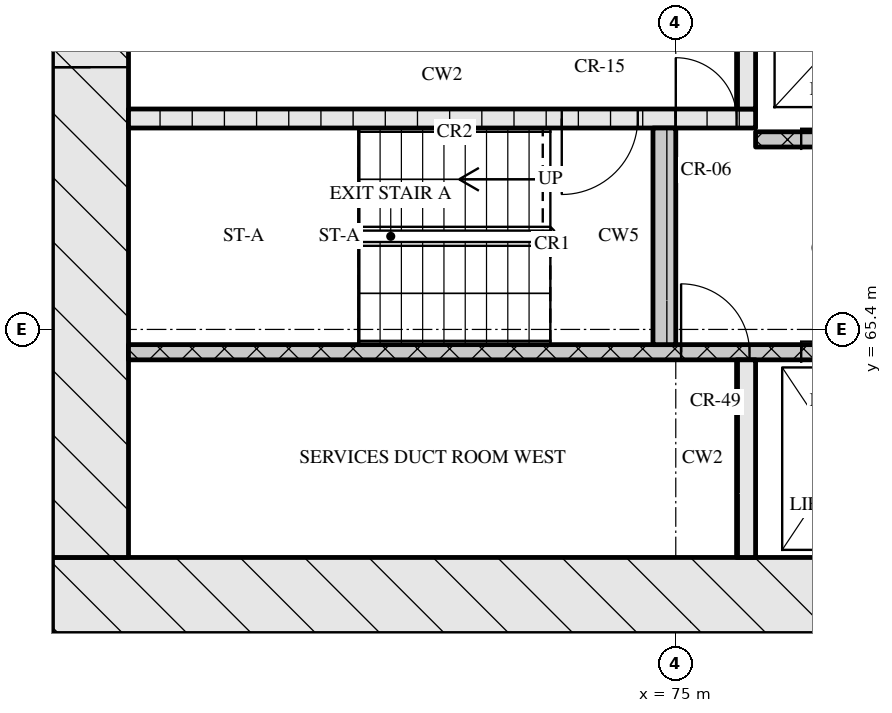
"""IFC4 building model, lengths in metres.
Left out: names, types, materials, properties, quantities, classifications, styles, units other than length and angle.
Written with IfcOpenShell. Run it as: python <this file> out.ifc"""

import sys

from ifc_helpers import new_model, si_unit, direction, frame, frame_2d, origin, place, context, subcontext, project, spatial, rectangle, extrude, element, fill, save


model = new_model("IFC4")
c1 = context("Model", 3, precision=1e-05, world=origin(), true_north=direction((0.0, 1.0)))
c2 = subcontext(c1, "Body", "Model", "MODEL_VIEW")
j1 = project(units=[si_unit("LENGTHUNIT", "METRE"), si_unit("PLANEANGLEUNIT", "RADIAN")], contexts=[c1])
p1 = place(None, origin())
s1 = spatial("IfcSite", under=j1, at=p1, CompositionType="ELEMENT")
p2 = place(p1, origin())
s2 = spatial("IfcBuilding", under=s1, at=p2, CompositionType="ELEMENT")
p3 = place(p2, frame((0.0, 0.0, 102.45)))
s3 = spatial("IfcBuildingStorey", under=s2, at=p3, CompositionType="ELEMENT", Elevation=102.45)
p4 = place(p3, frame((66.8, 61.9, 0.0), z_axis=(0.0, 0.0, 1.0), x_axis=(1.0, 0.0, 0.0)))
e1 = element("IfcWall", 1, at=p4, inside=s3, PredefinedType="SOLIDWALL", context=c2, shape_type="SweptSolid", body=[
    extrude(rectangle(XDim=41.6, YDim=1.0, at=frame_2d((20.8, 0.0))), origin(), (0.0, 0.0, 1.0), 3.32),
])
p5 = place(p4, frame((21.15, 0.0, 0.0)))
e2 = element("IfcOpeningElement", 2, at=p5, cuts=e1, PredefinedType="OPENING", context=c2, shape_type="SweptSolid", body=[
    extrude(rectangle(XDim=1.8, YDim=2.1, at=frame_2d((0.9, 1.05))), frame((0.0, 0.51, 0.0), z_axis=(0.0, -1.0, 0.0), x_axis=(1.0, 0.0, 0.0)), (0.0, 0.0, 1.0), 1.02),
])
p6 = place(p3, frame((67.3, 62.4, 0.0), z_axis=(0.0, 0.0, 1.0), x_axis=(0.0, 1.0, 0.0)))
e3 = element("IfcWall", 3, at=p6, inside=s3, PredefinedType="SOLIDWALL", context=c2, shape_type="SweptSolid", body=[
    extrude(rectangle(XDim=12.0, YDim=1.0, at=frame_2d((6.0, 0.0))), origin(), (0.0, 0.0, 1.0), 3.32),
])
p7 = place(p6, frame((6.45, 0.0, 0.0)))
e4 = element("IfcOpeningElement", 4, at=p7, cuts=e3, PredefinedType="OPENING", context=c2, shape_type="SweptSolid", body=[
    extrude(rectangle(XDim=1.2, YDim=2.1, at=frame_2d((0.6, 1.05))), frame((0.0, 0.51, 0.0), z_axis=(0.0, -1.0, 0.0), x_axis=(1.0, 0.0, 0.0)), (0.0, 0.0, 1.0), 1.02),
])
p8 = place(p3, frame((75.925, 62.4, 0.0), z_axis=(0.0, 0.0, 1.0), x_axis=(0.0, 1.0, 0.0)))
e5 = element("IfcWall", 5, at=p8, inside=s3, PredefinedType="SOLIDWALL", context=c2, shape_type="SweptSolid", body=[
    extrude(rectangle(XDim=2.6, YDim=0.25, at=frame_2d((1.3, 0.0))), origin(), (0.0, 0.0, 1.0), 3.32),
])
p9 = place(p3, frame((67.8, 65.1, 0.0), z_axis=(0.0, 0.0, 1.0), x_axis=(1.0, 0.0, 0.0)))
e6 = element("IfcWall", 6, at=p9, inside=s3, PredefinedType="SOLIDWALL", context=c2, shape_type="SweptSolid", body=[
    extrude(rectangle(XDim=18.5, YDim=0.2, at=frame_2d((9.25, 0.0))), origin(), (0.0, 0.0, 1.0), 3.32),
])
p10 = place(p9, frame((7.27, 0.0, 0.0)))
e7 = element("IfcOpeningElement", 7, at=p10, cuts=e6, PredefinedType="OPENING", context=c2, shape_type="SweptSolid", body=[
    extrude(rectangle(XDim=0.9, YDim=2.1, at=frame_2d((0.45, 1.05))), frame((0.0, 0.11, 0.0), z_axis=(0.0, -1.0, 0.0), x_axis=(1.0, 0.0, 0.0)), (0.0, 0.0, 1.0), 0.22),
])
p11 = place(p9, frame((8.85, 0.0, 0.0)))
e8 = element("IfcOpeningElement", 8, at=p11, cuts=e6, PredefinedType="OPENING", context=c2, shape_type="SweptSolid", body=[
    extrude(rectangle(XDim=1.1, YDim=2.1, at=frame_2d((0.55, 1.05))), frame((0.0, 0.11, 0.0), z_axis=(0.0, -1.0, 0.0), x_axis=(1.0, 0.0, 0.0)), (0.0, 0.0, 1.0), 0.22),
])
p12 = place(p9, frame((11.35, 0.0, 0.0)))
e9 = element("IfcOpeningElement", 9, at=p12, cuts=e6, PredefinedType="OPENING", context=c2, shape_type="SweptSolid", body=[
    extrude(rectangle(XDim=1.1, YDim=2.1, at=frame_2d((0.55, 1.05))), frame((0.0, 0.11, 0.0), z_axis=(0.0, -1.0, 0.0), x_axis=(1.0, 0.0, 0.0)), (0.0, 0.0, 1.0), 0.22),
])
p13 = place(p9, frame((13.85, 0.0, 0.0)))
e10 = element("IfcOpeningElement", 10, at=p13, cuts=e6, PredefinedType="OPENING", context=c2, shape_type="SweptSolid", body=[
    extrude(rectangle(XDim=1.1, YDim=2.1, at=frame_2d((0.55, 1.05))), frame((0.0, 0.11, 0.0), z_axis=(0.0, -1.0, 0.0), x_axis=(1.0, 0.0, 0.0)), (0.0, 0.0, 1.0), 0.22),
])
p14 = place(p9, frame((16.7, 0.0, 0.0)))
e11 = element("IfcOpeningElement", 11, at=p14, cuts=e6, PredefinedType="OPENING", context=c2, shape_type="SweptSolid", body=[
    extrude(rectangle(XDim=0.9, YDim=2.1, at=frame_2d((0.45, 1.05))), frame((0.0, 0.11, 0.0), z_axis=(0.0, -1.0, 0.0), x_axis=(1.0, 0.0, 0.0)), (0.0, 0.0, 1.0), 0.22),
])
p15 = place(p3, frame((74.85, 65.2, 0.0), z_axis=(0.0, 0.0, 1.0), x_axis=(0.0, 1.0, 0.0)))
e12 = element("IfcWall", 12, at=p15, inside=s3, PredefinedType="SOLIDWALL", context=c2, shape_type="SweptSolid", body=[
    extrude(rectangle(XDim=2.85, YDim=0.3, at=frame_2d((1.425, 0.0))), origin(), (0.0, 0.0, 1.0), 3.32),
])
p16 = place(p3, frame((76.05, 67.9, 0.0), z_axis=(0.0, 0.0, 1.0), x_axis=(1.0, 0.0, 0.0)))
e13 = element("IfcWall", 13, at=p16, inside=s3, PredefinedType="SOLIDWALL", context=c2, shape_type="SweptSolid", body=[
    extrude(rectangle(XDim=23.1, YDim=0.2, at=frame_2d((11.55, 0.0))), origin(), (0.0, 0.0, 1.0), 3.32),
])
p17 = place(p16, frame((0.6, 0.0, 0.0)))
e14 = element("IfcOpeningElement", 14, at=p17, cuts=e13, PredefinedType="OPENING", context=c2, shape_type="SweptSolid", body=[
    extrude(rectangle(XDim=1.1, YDim=2.1, at=frame_2d((0.55, 1.05))), frame((0.0, 0.11, 0.0), z_axis=(0.0, -1.0, 0.0), x_axis=(1.0, 0.0, 0.0)), (0.0, 0.0, 1.0), 0.22),
])
p18 = place(p16, frame((3.1, 0.0, 0.0)))
e15 = element("IfcOpeningElement", 15, at=p18, cuts=e13, PredefinedType="OPENING", context=c2, shape_type="SweptSolid", body=[
    extrude(rectangle(XDim=1.1, YDim=2.1, at=frame_2d((0.55, 1.05))), frame((0.0, 0.11, 0.0), z_axis=(0.0, -1.0, 0.0), x_axis=(1.0, 0.0, 0.0)), (0.0, 0.0, 1.0), 0.22),
])
p19 = place(p16, frame((5.6, 0.0, 0.0)))
e16 = element("IfcOpeningElement", 16, at=p19, cuts=e13, PredefinedType="OPENING", context=c2, shape_type="SweptSolid", body=[
    extrude(rectangle(XDim=1.1, YDim=2.1, at=frame_2d((0.55, 1.05))), frame((0.0, 0.11, 0.0), z_axis=(0.0, -1.0, 0.0), x_axis=(1.0, 0.0, 0.0)), (0.0, 0.0, 1.0), 0.22),
])
p20 = place(p16, frame((8.45, 0.0, 0.0)))
e17 = element("IfcOpeningElement", 17, at=p20, cuts=e13, PredefinedType="OPENING", context=c2, shape_type="SweptSolid", body=[
    extrude(rectangle(XDim=0.9, YDim=2.1, at=frame_2d((0.45, 1.05))), frame((0.0, 0.11, 0.0), z_axis=(0.0, -1.0, 0.0), x_axis=(1.0, 0.0, 0.0)), (0.0, 0.0, 1.0), 0.22),
])
p21 = place(p16, frame((10.91, 0.0, 0.0)))
e18 = element("IfcOpeningElement", 18, at=p21, cuts=e13, PredefinedType="OPENING", context=c2, shape_type="SweptSolid", body=[
    extrude(rectangle(XDim=0.9, YDim=2.1, at=frame_2d((0.45, 1.05))), frame((0.0, 0.11, 0.0), z_axis=(0.0, -1.0, 0.0), x_axis=(1.0, 0.0, 0.0)), (0.0, 0.0, 1.0), 0.22),
])
p22 = place(p16, frame((13.55, 0.0, 0.0)))
e19 = element("IfcOpeningElement", 19, at=p22, cuts=e13, PredefinedType="OPENING", context=c2, shape_type="SweptSolid", body=[
    extrude(rectangle(XDim=1.0, YDim=2.1, at=frame_2d((0.5, 1.05))), frame((0.0, 0.11, 0.0), z_axis=(0.0, -1.0, 0.0), x_axis=(1.0, 0.0, 0.0)), (0.0, 0.0, 1.0), 0.22),
])
p23 = place(p3, frame((67.8, 68.175, 0.0), z_axis=(0.0, 0.0, 1.0), x_axis=(1.0, 0.0, 0.0)))
e20 = element("IfcWall", 20, at=p23, inside=s3, PredefinedType="SOLIDWALL", context=c2, shape_type="SweptSolid", body=[
    extrude(rectangle(XDim=8.25, YDim=0.25, at=frame_2d((4.125, 0.0))), origin(), (0.0, 0.0, 1.0), 3.32),
])
p24 = place(p23, frame((5.7, 0.0, 0.0)))
e21 = element("IfcOpeningElement", 21, at=p24, cuts=e20, PredefinedType="OPENING", context=c2, shape_type="SweptSolid", body=[
    extrude(rectangle(XDim=1.0, YDim=2.1, at=frame_2d((0.5, 1.05))), frame((0.0, 0.135, 0.0), z_axis=(0.0, -1.0, 0.0), x_axis=(1.0, 0.0, 0.0)), (0.0, 0.0, 1.0), 0.27),
])
p25 = place(p23, frame((7.2, 0.0, 0.0)))
e22 = element("IfcOpeningElement", 22, at=p25, cuts=e20, PredefinedType="OPENING", context=c2, shape_type="SweptSolid", body=[
    extrude(rectangle(XDim=0.8, YDim=2.1, at=frame_2d((0.4, 1.05))), frame((0.0, 0.135, 0.0), z_axis=(0.0, -1.0, 0.0), x_axis=(1.0, 0.0, 0.0)), (0.0, 0.0, 1.0), 0.27),
])
p26 = place(p3, frame((75.925, 68.3, 0.0), z_axis=(0.0, 0.0, 1.0), x_axis=(0.0, 1.0, 0.0)))
e23 = element("IfcWall", 23, at=p26, inside=s3, PredefinedType="SOLIDWALL", context=c2, shape_type="SweptSolid", body=[
    extrude(rectangle(XDim=2.3, YDim=0.25, at=frame_2d((1.15, 0.0))), origin(), (0.0, 0.0, 1.0), 3.32),
])
p27 = place(p10, origin())
e24 = element("IfcDoor", 24, at=p27, inside=s3, OperationType="SINGLE_SWING_LEFT", PredefinedType="DOOR", context=c2, shape_type="SweptSolid", body=[
    extrude(rectangle(XDim=0.9, YDim=2.1, at=frame_2d((0.45, 1.05))), frame((0.0, 0.025, 0.0), z_axis=(0.0, -1.0, 0.0), x_axis=(1.0, 0.0, 0.0)), (0.0, 0.0, 1.0), 0.05),
])
fill(e7, e24)
p28 = place(p11, origin())
e25 = element("IfcDoor", 25, at=p28, inside=s3, OperationType="SLIDING_TO_LEFT", PredefinedType="DOOR", context=c2, shape_type="SweptSolid", body=[
    extrude(rectangle(XDim=1.1, YDim=2.1, at=frame_2d((0.55, 1.05))), frame((0.0, 0.025, 0.0), z_axis=(0.0, -1.0, 0.0), x_axis=(1.0, 0.0, 0.0)), (0.0, 0.0, 1.0), 0.05),
])
fill(e8, e25)
p29 = place(p17, origin())
e26 = element("IfcDoor", 26, at=p29, inside=s3, OperationType="SLIDING_TO_RIGHT", PredefinedType="DOOR", context=c2, shape_type="SweptSolid", body=[
    extrude(rectangle(XDim=1.1, YDim=2.1, at=frame_2d((0.55, 1.05))), frame((0.0, 0.025, 0.0), z_axis=(0.0, -1.0, 0.0), x_axis=(1.0, 0.0, 0.0)), (0.0, 0.0, 1.0), 0.05),
])
fill(e14, e26)
p30 = place(p24, origin())
e27 = element("IfcDoor", 27, at=p30, inside=s3, OperationType="SINGLE_SWING_RIGHT", PredefinedType="DOOR", context=c2, shape_type="SweptSolid", body=[
    extrude(rectangle(XDim=1.0, YDim=2.1, at=frame_2d((0.5, 1.05))), frame((0.0, 0.025, 0.0), z_axis=(0.0, -1.0, 0.0), x_axis=(1.0, 0.0, 0.0)), (0.0, 0.0, 1.0), 0.05),
])
fill(e21, e27)
p31 = place(p25, origin())
e28 = element("IfcDoor", 28, at=p31, inside=s3, OperationType="SINGLE_SWING_LEFT", PredefinedType="DOOR", context=c2, shape_type="SweptSolid", body=[
    extrude(rectangle(XDim=0.8, YDim=2.1, at=frame_2d((0.4, 1.05))), frame((0.0, 0.025, 0.0), z_axis=(0.0, -1.0, 0.0), x_axis=(1.0, 0.0, 0.0)), (0.0, 0.0, 1.0), 0.05),
])
fill(e22, e28)
p32 = place(p7, origin())
e29 = element("IfcDoor", 29, at=p32, inside=s3, OperationType="SINGLE_SWING_LEFT", PredefinedType="DOOR", context=c2, shape_type="SweptSolid", body=[
    extrude(rectangle(XDim=1.2, YDim=2.1, at=frame_2d((0.6, 1.05))), frame((0.0, 0.025, 0.0), z_axis=(0.0, -1.0, 0.0), x_axis=(1.0, 0.0, 0.0)), (0.0, 0.0, 1.0), 0.05),
])
fill(e4, e29)
save(model, sys.argv[1])
